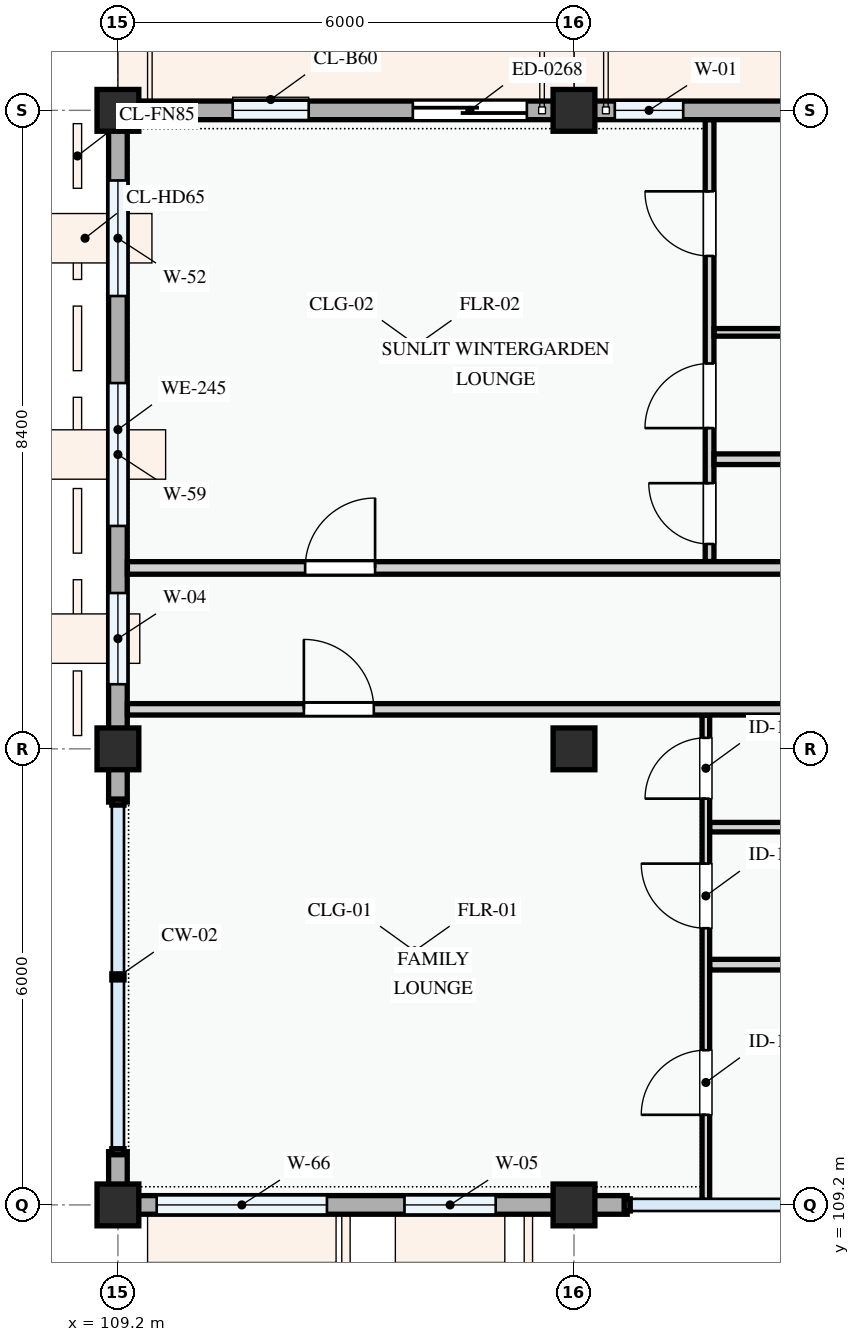
"""IFC4 building model, lengths in metres.
Left out: names, types, materials, properties, quantities, classifications, styles, units other than length and angle.
Written with IfcOpenShell. Run it as: python <this file> out.ifc"""

import sys

from ifc_helpers import new_model, si_unit, direction, frame, frame_2d, origin, origin_2d, place, context, subcontext, project, spatial, rectangle, extrude, element, fill, save


model = new_model("IFC4")
c1 = context("Model", 3, precision=1e-05, world=origin(), true_north=direction((0.0, 1.0)))
c2 = subcontext(c1, "Body", "Model", "MODEL_VIEW")
j1 = project(units=[si_unit("LENGTHUNIT", "METRE"), si_unit("PLANEANGLEUNIT", "RADIAN")], contexts=[c1])
p1 = place(None, origin())
s1 = spatial("IfcSite", under=j1, at=p1, CompositionType="ELEMENT")
p2 = place(p1, origin())
s2 = spatial("IfcBuilding", under=s1, at=p2, CompositionType="ELEMENT")
p3 = place(p2, frame((0.0, 0.0, 37.8)))
s3 = spatial("IfcBuildingStorey", under=s2, at=p3, CompositionType="ELEMENT", Elevation=37.8)
for number, where, z_axis, x_axis in (
    (1, (109.2, 109.2, 0.0), (0.0, 0.0, 1.0), (1.0, 0.0, 0.0)),
    (2, (109.2, 115.2, 0.0), (0.0, 0.0, 1.0), (1.0, 0.0, 0.0)),
    (3, (109.2, 123.6, 0.0), (0.0, 0.0, 1.0), (1.0, 0.0, 0.0)),
    (4, (115.2, 109.2, 0.0), (0.0, 0.0, 1.0), (1.0, 0.0, 0.0)),
    (5, (115.2, 115.2, 0.0), (0.0, 0.0, 1.0), (1.0, 0.0, 0.0)),
    (6, (115.2, 123.6, 0.0), (0.0, 0.0, 1.0), (1.0, 0.0, 0.0)),
):
    element("IfcColumn", number, at=place(p3, frame(where, z_axis=z_axis, x_axis=x_axis)), inside=s3, PredefinedType="COLUMN", context=c2, shape_type="SweptSolid", body=[
        extrude(rectangle(XDim=0.55, YDim=0.55, at=origin_2d()), origin(), (0.0, 0.0, 1.0), 3.3),
    ])
p4 = place(p3, frame((123.6, 123.6, 0.0), z_axis=(0.0, 0.0, 1.0), x_axis=(-1.0, 0.0, 0.0)))
e7 = element("IfcWall", 7, at=p4, inside=s3, PredefinedType="STANDARD", context=c2, shape_type="SweptSolid", body=[
    extrude(rectangle(XDim=8.4, YDim=0.245, at=frame_2d((4.2, 0.0))), origin(), (0.0, 0.0, 1.0), 2.375),
])
p5 = place(p4, frame((2.12, 0.0, 0.0)))
e8 = element("IfcOpeningElement", 8, at=p5, cuts=e7, PredefinedType="OPENING", context=c2, shape_type="SweptSolid", body=[
    extrude(rectangle(XDim=1.4, YDim=2.2, at=frame_2d((0.7, 1.1))), frame((0.0, 0.133, 0.0), z_axis=(0.0, -1.0, 0.0), x_axis=(1.0, 0.0, 0.0)), (0.0, 0.0, 1.0), 0.265),
])
p6 = place(p4, frame((0.515, 0.0, 0.78)))
e9 = element("IfcOpeningElement", 9, at=p6, cuts=e7, PredefinedType="OPENING", context=c2, shape_type="SweptSolid", body=[
    extrude(rectangle(XDim=0.95, YDim=1.15, at=frame_2d((0.475, 0.575))), frame((0.0, 0.133, 0.0), z_axis=(0.0, -1.0, 0.0), x_axis=(1.0, 0.0, 0.0)), (0.0, 0.0, 1.0), 0.265),
])
p7 = place(p4, frame((4.593, 0.0, 0.78)))
e10 = element("IfcOpeningElement", 10, at=p7, cuts=e7, PredefinedType="OPENING", context=c2, shape_type="SweptSolid", body=[
    extrude(rectangle(XDim=1.0, YDim=1.25, at=frame_2d((0.5, 0.625))), frame((0.0, 0.133, 0.0), z_axis=(0.0, -1.0, 0.0), x_axis=(1.0, 0.0, 0.0)), (0.0, 0.0, 1.0), 0.265),
])
p8 = place(p4, frame((6.963, 0.0, 0.78)))
e11 = element("IfcOpeningElement", 11, at=p8, cuts=e7, PredefinedType="OPENING", context=c2, shape_type="SweptSolid", body=[
    extrude(rectangle(XDim=0.9, YDim=1.2, at=frame_2d((0.45, 0.6))), frame((0.0, 0.133, 0.0), z_axis=(0.0, -1.0, 0.0), x_axis=(1.0, 0.0, 0.0)), (0.0, 0.0, 1.0), 0.265),
])
p9 = place(p3, frame((115.2, 123.6, 0.0), z_axis=(0.0, 0.0, 1.0), x_axis=(-1.0, 0.0, 0.0)))
e12 = element("IfcWall", 12, at=p9, inside=s3, PredefinedType="STANDARD", context=c2, shape_type="SweptSolid", body=[
    extrude(rectangle(XDim=6.0, YDim=0.245, at=frame_2d((3.0, 0.0))), origin(), (0.0, 0.0, 1.0), 2.525),
])
p10 = place(p9, frame((0.62, 0.0, 0.0)))
e13 = element("IfcOpeningElement", 13, at=p10, cuts=e12, PredefinedType="OPENING", context=c2, shape_type="SweptSolid", body=[
    extrude(rectangle(XDim=1.5, YDim=2.2, at=frame_2d((0.75, 1.1))), frame((0.0, 0.133, 0.0), z_axis=(0.0, -1.0, 0.0), x_axis=(1.0, 0.0, 0.0)), (0.0, 0.0, 1.0), 0.265),
])
p11 = place(p9, frame((3.49, 0.0, 0.78)))
e14 = element("IfcOpeningElement", 14, at=p11, cuts=e12, PredefinedType="OPENING", context=c2, shape_type="SweptSolid", body=[
    extrude(rectangle(XDim=1.0, YDim=1.25, at=frame_2d((0.5, 0.625))), frame((0.0, 0.133, 0.0), z_axis=(0.0, -1.0, 0.0), x_axis=(1.0, 0.0, 0.0)), (0.0, 0.0, 1.0), 0.265),
])
p12 = place(p3, frame((109.2, 123.6, 0.0), z_axis=(0.0, 0.0, 1.0), x_axis=(0.0, -1.0, 0.0)))
e15 = element("IfcWall", 15, at=p12, inside=s3, PredefinedType="STANDARD", context=c2, shape_type="SweptSolid", body=[
    extrude(rectangle(XDim=8.4, YDim=0.245, at=frame_2d((4.2, 0.0))), origin(), (0.0, 0.0, 1.0), 2.425),
])
p13 = place(p12, frame((0.923, 0.0, 0.78)))
e16 = element("IfcOpeningElement", 16, at=p13, cuts=e15, PredefinedType="OPENING", context=c2, shape_type="SweptSolid", body=[
    extrude(rectangle(XDim=1.52, YDim=1.42, at=frame_2d((0.76, 0.71))), frame((0.0, 0.133, 0.0), z_axis=(0.0, -1.0, 0.0), x_axis=(1.0, 0.0, 0.0)), (0.0, 0.0, 1.0), 0.265),
])
p14 = place(p12, frame((3.587, 0.0, 0.78)))
e17 = element("IfcOpeningElement", 17, at=p14, cuts=e15, PredefinedType="OPENING", context=c2, shape_type="SweptSolid", body=[
    extrude(rectangle(XDim=1.88, YDim=1.52, at=frame_2d((0.94, 0.76))), frame((0.0, 0.133, 0.0), z_axis=(0.0, -1.0, 0.0), x_axis=(1.0, 0.0, 0.0)), (0.0, 0.0, 1.0), 0.265),
])
p15 = place(p12, frame((6.35, 0.0, 0.78)))
e18 = element("IfcOpeningElement", 18, at=p15, cuts=e15, PredefinedType="OPENING", context=c2, shape_type="SweptSolid", body=[
    extrude(rectangle(XDim=1.2, YDim=1.35, at=frame_2d((0.6, 0.675))), frame((0.0, 0.133, 0.0), z_axis=(0.0, -1.0, 0.0), x_axis=(1.0, 0.0, 0.0)), (0.0, 0.0, 1.0), 0.265),
])
p16 = place(p3, frame((109.2, 115.2, 0.0), z_axis=(0.0, 0.0, 1.0), x_axis=(0.0, -1.0, 0.0)))
e19 = element("IfcWall", 19, at=p16, inside=s3, PredefinedType="STANDARD", context=c2, shape_type="SweptSolid", body=[
    extrude(rectangle(XDim=0.7, YDim=0.245, at=frame_2d((0.35, 0.0))), origin(), (0.0, 0.0, 1.0), 2.575),
])
p17 = place(p3, frame((109.2, 109.9, 0.0), z_axis=(0.0, 0.0, 1.0), x_axis=(0.0, -1.0, 0.0)))
e20 = element("IfcWall", 20, at=p17, inside=s3, PredefinedType="STANDARD", context=c2, shape_type="SweptSolid", body=[
    extrude(rectangle(XDim=0.575, YDim=0.245, at=frame_2d((0.288, 0.0))), origin(), (0.0, 0.0, 1.0), 2.575),
])
p18 = place(p3, frame((109.2, 109.2, 0.0), z_axis=(0.0, 0.0, 1.0), x_axis=(1.0, 0.0, 0.0)))
e21 = element("IfcWall", 21, at=p18, inside=s3, PredefinedType="STANDARD", context=c2, shape_type="SweptSolid", body=[
    extrude(rectangle(XDim=6.0, YDim=0.245, at=frame_2d((3.0, 0.0))), origin(), (0.0, 0.0, 1.0), 2.525),
])
p19 = place(p18, frame((0.51, 0.0, 0.78)))
e22 = element("IfcOpeningElement", 22, at=p19, cuts=e21, PredefinedType="OPENING", context=c2, shape_type="SweptSolid", body=[
    extrude(rectangle(XDim=2.24, YDim=1.52, at=frame_2d((1.12, 0.76))), frame((0.0, 0.133, 0.0), z_axis=(0.0, -1.0, 0.0), x_axis=(1.0, 0.0, 0.0)), (0.0, 0.0, 1.0), 0.265),
])
p20 = place(p18, frame((3.77, 0.0, 0.78)))
e23 = element("IfcOpeningElement", 23, at=p20, cuts=e21, PredefinedType="OPENING", context=c2, shape_type="SweptSolid", body=[
    extrude(rectangle(XDim=1.2, YDim=1.5, at=frame_2d((0.6, 0.75))), frame((0.0, 0.133, 0.0), z_axis=(0.0, -1.0, 0.0), x_axis=(1.0, 0.0, 0.0)), (0.0, 0.0, 1.0), 0.265),
])
p21 = place(p3, frame((115.2, 109.2, 0.0), z_axis=(0.0, 0.0, 1.0), x_axis=(1.0, 0.0, 0.0)))
e24 = element("IfcWall", 24, at=p21, inside=s3, PredefinedType="STANDARD", context=c2, shape_type="SweptSolid", body=[
    extrude(rectangle(XDim=0.7, YDim=0.245, at=frame_2d((0.35, 0.0))), origin(), (0.0, 0.0, 1.0), 2.375),
])
p22 = place(p3, frame((116.935, 109.26, 0.0), z_axis=(0.0, 0.0, 1.0), x_axis=(0.0, 1.0, 0.0)))
e25 = element("IfcWall", 25, at=p22, inside=s3, PredefinedType="PARTITIONING", context=c2, shape_type="SweptSolid", body=[
    extrude(rectangle(XDim=6.383, YDim=0.1, at=frame_2d((3.191, 0.0))), origin(), (0.0, 0.0, 1.0), 3.0),
])
p23 = place(p22, frame((1.125, 0.0, 0.0)))
e26 = element("IfcOpeningElement", 26, at=p23, cuts=e25, PredefinedType="OPENING", context=c2, shape_type="SweptSolid", body=[
    extrude(rectangle(XDim=0.85, YDim=2.1, at=frame_2d((0.425, 1.05))), frame((0.0, 0.06, 0.0), z_axis=(0.0, -1.0, 0.0), x_axis=(1.0, 0.0, 0.0)), (0.0, 0.0, 1.0), 0.12),
])
p24 = place(p22, frame((3.58, 0.0, 0.0)))
e27 = element("IfcOpeningElement", 27, at=p24, cuts=e25, PredefinedType="OPENING", context=c2, shape_type="SweptSolid", body=[
    extrude(rectangle(XDim=0.85, YDim=2.1, at=frame_2d((0.425, 1.05))), frame((0.0, 0.06, 0.0), z_axis=(0.0, -1.0, 0.0), x_axis=(1.0, 0.0, 0.0)), (0.0, 0.0, 1.0), 0.12),
])
p25 = place(p22, frame((5.285, 0.0, 0.0)))
e28 = element("IfcOpeningElement", 28, at=p25, cuts=e25, PredefinedType="OPENING", context=c2, shape_type="SweptSolid", body=[
    extrude(rectangle(XDim=0.8, YDim=2.1, at=frame_2d((0.4, 1.05))), frame((0.0, 0.06, 0.0), z_axis=(0.0, -1.0, 0.0), x_axis=(1.0, 0.0, 0.0)), (0.0, 0.0, 1.0), 0.12),
])
p26 = place(p3, frame((116.987, 112.361, 0.0), z_axis=(0.0, 0.0, 1.0), x_axis=(1.0, 0.0, 0.0)))
e29 = element("IfcWall", 29, at=p26, inside=s3, PredefinedType="PARTITIONING", context=c2, shape_type="SweptSolid", body=[
    extrude(rectangle(XDim=4.721, YDim=0.14, at=frame_2d((2.36, 0.0))), origin(), (0.0, 0.0, 1.0), 3.0),
])
p27 = place(p3, frame((116.987, 114.17, 0.0), z_axis=(0.0, 0.0, 1.0), x_axis=(1.0, 0.0, 0.0)))
e30 = element("IfcWall", 30, at=p27, inside=s3, PredefinedType="PARTITIONING", context=c2, shape_type="SweptSolid", body=[
    extrude(rectangle(XDim=4.721, YDim=0.125, at=frame_2d((2.36, 0.0))), origin(), (0.0, 0.0, 1.0), 3.0),
])
p28 = place(p3, frame((116.984, 117.665, 0.0), z_axis=(0.0, 0.0, 1.0), x_axis=(0.0, 1.0, 0.0)))
e31 = element("IfcWall", 31, at=p28, inside=s3, PredefinedType="PARTITIONING", context=c2, shape_type="SweptSolid", body=[
    extrude(rectangle(XDim=5.811, YDim=0.115, at=frame_2d((2.906, 0.0))), origin(), (0.0, 0.0, 1.0), 3.0),
])
p29 = place(p28, frame((0.231, 0.0, 0.0)))
e32 = element("IfcOpeningElement", 32, at=p29, cuts=e31, PredefinedType="OPENING", context=c2, shape_type="SweptSolid", body=[
    extrude(rectangle(XDim=0.8, YDim=2.1, at=frame_2d((0.4, 1.05))), frame((0.0, 0.067, 0.0), z_axis=(0.0, -1.0, 0.0), x_axis=(1.0, 0.0, 0.0)), (0.0, 0.0, 1.0), 0.135),
])
p30 = place(p28, frame((1.755, 0.0, 0.0)))
e33 = element("IfcOpeningElement", 33, at=p30, cuts=e31, PredefinedType="OPENING", context=c2, shape_type="SweptSolid", body=[
    extrude(rectangle(XDim=0.85, YDim=2.1, at=frame_2d((0.425, 1.05))), frame((0.0, 0.067, 0.0), z_axis=(0.0, -1.0, 0.0), x_axis=(1.0, 0.0, 0.0)), (0.0, 0.0, 1.0), 0.135),
])
p31 = place(p28, frame((4.02, 0.0, 0.0)))
e34 = element("IfcOpeningElement", 34, at=p31, cuts=e31, PredefinedType="OPENING", context=c2, shape_type="SweptSolid", body=[
    extrude(rectangle(XDim=0.85, YDim=2.1, at=frame_2d((0.425, 1.05))), frame((0.0, 0.067, 0.0), z_axis=(0.0, -1.0, 0.0), x_axis=(1.0, 0.0, 0.0)), (0.0, 0.0, 1.0), 0.135),
])
p32 = place(p3, frame((117.043, 120.679, 0.0), z_axis=(0.0, 0.0, 1.0), x_axis=(1.0, 0.0, 0.0)))
e35 = element("IfcWall", 35, at=p32, inside=s3, PredefinedType="PARTITIONING", context=c2, shape_type="SweptSolid", body=[
    extrude(rectangle(XDim=4.655, YDim=0.1, at=frame_2d((2.327, 0.0))), origin(), (0.0, 0.0, 1.0), 3.0),
])
p33 = place(p3, frame((117.043, 119.01, 0.0), z_axis=(0.0, 0.0, 1.0), x_axis=(1.0, 0.0, 0.0)))
e36 = element("IfcWall", 36, at=p33, inside=s3, PredefinedType="PARTITIONING", context=c2, shape_type="SweptSolid", body=[
    extrude(rectangle(XDim=4.655, YDim=0.14, at=frame_2d((2.327, 0.0))), origin(), (0.0, 0.0, 1.0), 3.0),
])
p34 = place(p3, frame((109.324, 115.72, 0.0), z_axis=(0.0, 0.0, 1.0), x_axis=(1.0, 0.0, 0.0)))
e37 = element("IfcWall", 37, at=p34, inside=s3, PredefinedType="PARTITIONING", context=c2, shape_type="SweptSolid", body=[
    extrude(rectangle(XDim=40.726, YDim=0.15, at=frame_2d((20.363, 0.0))), origin(), (0.0, 0.0, 1.0), 3.0),
])
p35 = place(p34, frame((2.322, 0.0, 0.0)))
e38 = element("IfcOpeningElement", 38, at=p35, cuts=e37, PredefinedType="OPENING", context=c2, shape_type="SweptSolid", body=[
    extrude(rectangle(XDim=0.92, YDim=2.1, at=frame_2d((0.46, 1.05))), frame((0.0, 0.085, 0.0), z_axis=(0.0, -1.0, 0.0), x_axis=(1.0, 0.0, 0.0)), (0.0, 0.0, 1.0), 0.17),
])
p36 = place(p34, frame((16.832, 0.0, 0.0)))
e39 = element("IfcOpeningElement", 39, at=p36, cuts=e37, PredefinedType="OPENING", context=c2, shape_type="SweptSolid", body=[
    extrude(rectangle(XDim=0.92, YDim=2.1, at=frame_2d((0.46, 1.05))), frame((0.0, 0.085, 0.0), z_axis=(0.0, -1.0, 0.0), x_axis=(1.0, 0.0, 0.0)), (0.0, 0.0, 1.0), 0.17),
])
p37 = place(p34, frame((31.208, 0.0, 0.0)))
e40 = element("IfcOpeningElement", 40, at=p37, cuts=e37, PredefinedType="OPENING", context=c2, shape_type="SweptSolid", body=[
    extrude(rectangle(XDim=0.92, YDim=2.1, at=frame_2d((0.46, 1.05))), frame((0.0, 0.085, 0.0), z_axis=(0.0, -1.0, 0.0), x_axis=(1.0, 0.0, 0.0)), (0.0, 0.0, 1.0), 0.17),
])
p38 = place(p3, frame((109.324, 117.58, 0.0), z_axis=(0.0, 0.0, 1.0), x_axis=(1.0, 0.0, 0.0)))
e41 = element("IfcWall", 41, at=p38, inside=s3, PredefinedType="PARTITIONING", context=c2, shape_type="SweptSolid", body=[
    extrude(rectangle(XDim=43.216, YDim=0.165, at=frame_2d((21.608, 0.0))), origin(), (0.0, 0.0, 1.0), 3.0),
])
p39 = place(p38, frame((2.339, 0.0, 0.0)))
e42 = element("IfcOpeningElement", 42, at=p39, cuts=e41, PredefinedType="OPENING", context=c2, shape_type="SweptSolid", body=[
    extrude(rectangle(XDim=0.92, YDim=2.1, at=frame_2d((0.46, 1.05))), frame((0.0, 0.093, 0.0), z_axis=(0.0, -1.0, 0.0), x_axis=(1.0, 0.0, 0.0)), (0.0, 0.0, 1.0), 0.185),
])
p40 = place(p38, frame((16.851, 0.0, 0.0)))
e43 = element("IfcOpeningElement", 43, at=p40, cuts=e41, PredefinedType="OPENING", context=c2, shape_type="SweptSolid", body=[
    extrude(rectangle(XDim=0.96, YDim=2.12, at=frame_2d((0.48, 1.06))), frame((0.0, 0.093, 0.0), z_axis=(0.0, -1.0, 0.0), x_axis=(1.0, 0.0, 0.0)), (0.0, 0.0, 1.0), 0.185),
])
p41 = place(p38, frame((31.222, 0.0, 0.0)))
e44 = element("IfcOpeningElement", 44, at=p41, cuts=e41, PredefinedType="OPENING", context=c2, shape_type="SweptSolid", body=[
    extrude(rectangle(XDim=0.92, YDim=2.1, at=frame_2d((0.46, 1.05))), frame((0.0, 0.093, 0.0), z_axis=(0.0, -1.0, 0.0), x_axis=(1.0, 0.0, 0.0)), (0.0, 0.0, 1.0), 0.185),
])
p42 = place(p8, origin())
e45 = element("IfcWindow", 45, at=p42, inside=s3, PartitioningType="SINGLE_PANEL", PredefinedType="WINDOW", context=c2, shape_type="SweptSolid", body=[
    extrude(rectangle(XDim=0.9, YDim=1.2, at=frame_2d((0.45, 0.6))), frame((0.0, 0.03, 0.0), z_axis=(0.0, -1.0, 0.0), x_axis=(1.0, 0.0, 0.0)), (0.0, 0.0, 1.0), 0.06),
])
fill(e11, e45)
p43 = place(p10, frame((1.5, 0.0, 0.0), z_axis=(0.0, 0.0, 1.0), x_axis=(-1.0, 0.0, 0.0)))
e46 = element("IfcDoor", 46, at=p43, inside=s3, OperationType="SLIDING_TO_RIGHT", PredefinedType="DOOR", context=c2, shape_type="SweptSolid", body=[
    extrude(rectangle(XDim=1.5, YDim=2.2, at=frame_2d((0.75, 1.1))), frame((0.0, 0.025, 0.0), z_axis=(0.0, -1.0, 0.0), x_axis=(1.0, 0.0, 0.0)), (0.0, 0.0, 1.0), 0.05),
])
fill(e13, e46)
p44 = place(p11, origin())
e47 = element("IfcWindow", 47, at=p44, inside=s3, PartitioningType="SINGLE_PANEL", PredefinedType="WINDOW", context=c2, shape_type="SweptSolid", body=[
    extrude(rectangle(XDim=1.0, YDim=1.25, at=frame_2d((0.5, 0.625))), frame((0.0, 0.03, 0.0), z_axis=(0.0, -1.0, 0.0), x_axis=(1.0, 0.0, 0.0)), (0.0, 0.0, 1.0), 0.06),
])
fill(e14, e47)
p45 = place(p13, origin())
e48 = element("IfcWindow", 48, at=p45, inside=s3, PartitioningType="SINGLE_PANEL", PredefinedType="WINDOW", context=c2, shape_type="SweptSolid", body=[
    extrude(rectangle(XDim=1.52, YDim=1.42, at=frame_2d((0.76, 0.71))), frame((0.0, 0.03, 0.0), z_axis=(0.0, -1.0, 0.0), x_axis=(1.0, 0.0, 0.0)), (0.0, 0.0, 1.0), 0.06),
])
fill(e16, e48)
p46 = place(p14, origin())
e49 = element("IfcWindow", 49, at=p46, inside=s3, PartitioningType="DOUBLE_PANEL_VERTICAL", PredefinedType="WINDOW", context=c2, shape_type="SweptSolid", body=[
    extrude(rectangle(XDim=1.88, YDim=1.52, at=frame_2d((0.94, 0.76))), frame((0.0, 0.03, 0.0), z_axis=(0.0, -1.0, 0.0), x_axis=(1.0, 0.0, 0.0)), (0.0, 0.0, 1.0), 0.06),
])
fill(e17, e49)
p47 = place(p15, origin())
e50 = element("IfcWindow", 50, at=p47, inside=s3, PartitioningType="SINGLE_PANEL", PredefinedType="WINDOW", context=c2, shape_type="SweptSolid", body=[
    extrude(rectangle(XDim=1.2, YDim=1.35, at=frame_2d((0.6, 0.675))), frame((0.0, 0.03, 0.0), z_axis=(0.0, -1.0, 0.0), x_axis=(1.0, 0.0, 0.0)), (0.0, 0.0, 1.0), 0.06),
])
fill(e18, e50)
p48 = place(p19, origin())
e51 = element("IfcWindow", 51, at=p48, inside=s3, PartitioningType="DOUBLE_PANEL_VERTICAL", PredefinedType="WINDOW", context=c2, shape_type="SweptSolid", body=[
    extrude(rectangle(XDim=2.24, YDim=1.52, at=frame_2d((1.12, 0.76))), frame((0.0, 0.03, 0.0), z_axis=(0.0, -1.0, 0.0), x_axis=(1.0, 0.0, 0.0)), (0.0, 0.0, 1.0), 0.06),
])
fill(e22, e51)
p49 = place(p20, origin())
e52 = element("IfcWindow", 52, at=p49, inside=s3, PartitioningType="SINGLE_PANEL", PredefinedType="WINDOW", context=c2, shape_type="SweptSolid", body=[
    extrude(rectangle(XDim=1.2, YDim=1.5, at=frame_2d((0.6, 0.75))), frame((0.0, 0.03, 0.0), z_axis=(0.0, -1.0, 0.0), x_axis=(1.0, 0.0, 0.0)), (0.0, 0.0, 1.0), 0.06),
])
fill(e23, e52)
p50 = place(p23, origin())
e53 = element("IfcDoor", 53, at=p50, inside=s3, OperationType="SINGLE_SWING_LEFT", PredefinedType="DOOR", context=c2, shape_type="SweptSolid", body=[
    extrude(rectangle(XDim=0.85, YDim=2.1, at=frame_2d((0.425, 1.05))), frame((0.0, 0.025, 0.0), z_axis=(0.0, -1.0, 0.0), x_axis=(1.0, 0.0, 0.0)), (0.0, 0.0, 1.0), 0.05),
])
fill(e26, e53)
p51 = place(p24, origin())
e54 = element("IfcDoor", 54, at=p51, inside=s3, OperationType="SINGLE_SWING_RIGHT", PredefinedType="DOOR", context=c2, shape_type="SweptSolid", body=[
    extrude(rectangle(XDim=0.85, YDim=2.1, at=frame_2d((0.425, 1.05))), frame((0.0, 0.025, 0.0), z_axis=(0.0, -1.0, 0.0), x_axis=(1.0, 0.0, 0.0)), (0.0, 0.0, 1.0), 0.05),
])
fill(e27, e54)
p52 = place(p25, origin())
e55 = element("IfcDoor", 55, at=p52, inside=s3, OperationType="SINGLE_SWING_LEFT", PredefinedType="DOOR", context=c2, shape_type="SweptSolid", body=[
    extrude(rectangle(XDim=0.8, YDim=2.1, at=frame_2d((0.4, 1.05))), frame((0.0, 0.025, 0.0), z_axis=(0.0, -1.0, 0.0), x_axis=(1.0, 0.0, 0.0)), (0.0, 0.0, 1.0), 0.05),
])
fill(e28, e55)
p53 = place(p29, origin())
e56 = element("IfcDoor", 56, at=p53, inside=s3, OperationType="SINGLE_SWING_RIGHT", PredefinedType="DOOR", context=c2, shape_type="SweptSolid", body=[
    extrude(rectangle(XDim=0.8, YDim=2.1, at=frame_2d((0.4, 1.05))), frame((0.0, 0.025, 0.0), z_axis=(0.0, -1.0, 0.0), x_axis=(1.0, 0.0, 0.0)), (0.0, 0.0, 1.0), 0.05),
])
fill(e32, e56)
p54 = place(p30, origin())
e57 = element("IfcDoor", 57, at=p54, inside=s3, OperationType="SINGLE_SWING_LEFT", PredefinedType="DOOR", context=c2, shape_type="SweptSolid", body=[
    extrude(rectangle(XDim=0.85, YDim=2.1, at=frame_2d((0.425, 1.05))), frame((0.0, 0.025, 0.0), z_axis=(0.0, -1.0, 0.0), x_axis=(1.0, 0.0, 0.0)), (0.0, 0.0, 1.0), 0.05),
])
fill(e33, e57)
p55 = place(p31, origin())
e58 = element("IfcDoor", 58, at=p55, inside=s3, OperationType="SINGLE_SWING_RIGHT", PredefinedType="DOOR", context=c2, shape_type="SweptSolid", body=[
    extrude(rectangle(XDim=0.85, YDim=2.1, at=frame_2d((0.425, 1.05))), frame((0.0, 0.025, 0.0), z_axis=(0.0, -1.0, 0.0), x_axis=(1.0, 0.0, 0.0)), (0.0, 0.0, 1.0), 0.05),
])
fill(e34, e58)
p56 = place(p35, origin())
e59 = element("IfcDoor", 59, at=p56, inside=s3, OperationType="SINGLE_SWING_LEFT", PredefinedType="DOOR", context=c2, shape_type="SweptSolid", body=[
    extrude(rectangle(XDim=0.92, YDim=2.1, at=frame_2d((0.46, 1.05))), frame((0.0, 0.025, 0.0), z_axis=(0.0, -1.0, 0.0), x_axis=(1.0, 0.0, 0.0)), (0.0, 0.0, 1.0), 0.05),
])
fill(e38, e59)
p57 = place(p39, origin())
e60 = element("IfcDoor", 60, at=p57, inside=s3, OperationType="SINGLE_SWING_RIGHT", PredefinedType="DOOR", context=c2, shape_type="SweptSolid", body=[
    extrude(rectangle(XDim=0.92, YDim=2.1, at=frame_2d((0.46, 1.05))), frame((0.0, 0.025, 0.0), z_axis=(0.0, -1.0, 0.0), x_axis=(1.0, 0.0, 0.0)), (0.0, 0.0, 1.0), 0.05),
])
fill(e42, e60)
save(model, sys.argv[1])
